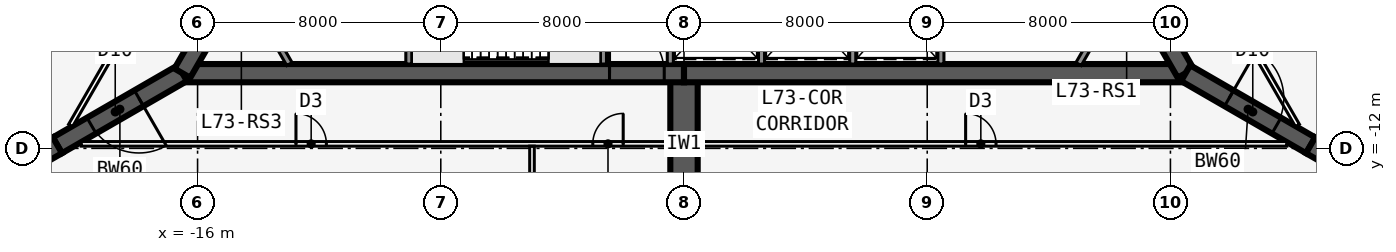
"""IFC4 building model, lengths in metres.
Left out: names, types, materials, properties, quantities, classifications, styles, units other than length and angle.
Written with IfcOpenShell. Run it as: python <this file> out.ifc"""

import sys

from ifc_helpers import new_model, si_unit, direction, frame, frame_2d, origin, place, context, subcontext, project, spatial, polyline, rectangle, outline, extrude, element, fill, save


model = new_model("IFC4")
c1 = context("Model", 3, precision=1e-05, world=origin(), true_north=direction((0.0, 1.0)))
c2 = subcontext(c1, "Body", "Model", "MODEL_VIEW")
j1 = project(units=[si_unit("LENGTHUNIT", "METRE"), si_unit("PLANEANGLEUNIT", "RADIAN")], contexts=[c1])
p1 = place(None, origin())
s1 = spatial("IfcSite", under=j1, at=p1, CompositionType="ELEMENT")
p2 = place(p1, origin())
s2 = spatial("IfcBuilding", under=s1, at=p2, CompositionType="ELEMENT")
p3 = place(p2, frame((0.0, 0.0, 275.3)))
s3 = spatial("IfcBuildingStorey", under=s2, at=p3, CompositionType="ELEMENT", Elevation=275.3)
p4 = place(p3, frame((-16.5, -9.526, 0.0), z_axis=(0.0, 0.0, 1.0), x_axis=(1.0, 0.0, 0.0)))
e1 = element("IfcWall", 1, at=p4, inside=s3, PredefinedType="SHEAR", context=c2, shape_type="SweptSolid", body=[
    extrude(rectangle(XDim=16.5, YDim=0.6, at=frame_2d((8.25, 0.0))), origin(), (0.0, 0.0, 1.0), 6.0),
])
p5 = place(p4, frame((14.05, 0.0, 0.0)))
e2 = element("IfcOpeningElement", 2, at=p5, cuts=e1, PredefinedType="OPENING", context=c2, shape_type="SweptSolid", body=[
    extrude(rectangle(XDim=1.8, YDim=2.13, at=frame_2d((0.9, 1.065))), frame((0.0, 0.31, 0.0), z_axis=(0.0, -1.0, 0.0), x_axis=(1.0, 0.0, 0.0)), (0.0, 0.0, 1.0), 0.62),
])
p6 = place(p3, frame((0.0, -9.526, 0.0), z_axis=(0.0, 0.0, 1.0), x_axis=(1.0, 0.0, 0.0)))
e3 = element("IfcWall", 3, at=p6, inside=s3, PredefinedType="SHEAR", context=c2, shape_type="SweptSolid", body=[
    extrude(rectangle(XDim=16.5, YDim=0.6, at=frame_2d((8.25, 0.0))), origin(), (0.0, 0.0, 1.0), 6.0),
])
p7 = place(p3, frame((-9.05, -5.951, 0.0), z_axis=(0.0, 0.0, 1.0), x_axis=(0.0, -1.0, 0.0)))
e4 = element("IfcWall", 4, at=p7, inside=s3, PredefinedType="SOLIDWALL", context=c2, shape_type="SweptSolid", body=[
    extrude(rectangle(XDim=3.275, YDim=0.2, at=frame_2d((1.637, 0.0))), origin(), (0.0, 0.0, 1.0), 5.75),
])
p8 = place(p3, frame((-2.65, -5.951, 0.0), z_axis=(0.0, 0.0, 1.0), x_axis=(0.0, -1.0, 0.0)))
e5 = element("IfcWall", 5, at=p8, inside=s3, PredefinedType="SOLIDWALL", context=c2, shape_type="SweptSolid", body=[
    extrude(rectangle(XDim=3.275, YDim=0.2, at=frame_2d((1.637, 0.0))), origin(), (0.0, 0.0, 1.0), 5.75),
])
p9 = place(p8, frame((1.675, 0.0, 0.0)))
e6 = element("IfcOpeningElement", 6, at=p9, cuts=e5, PredefinedType="OPENING", context=c2, shape_type="SweptSolid", body=[
    extrude(rectangle(XDim=1.0, YDim=2.13, at=frame_2d((0.5, 1.065))), frame((0.0, 0.11, 0.0), z_axis=(0.0, -1.0, 0.0), x_axis=(1.0, 0.0, 0.0)), (0.0, 0.0, 1.0), 0.22),
])
for number, where, z_axis, x_axis in (
    (7, (-0.45, -5.951, 0.0), (0.0, 0.0, 1.0), (0.0, -1.0, 0.0)),
    (8, (2.55, -5.951, 0.0), (0.0, 0.0, 1.0), (0.0, -1.0, 0.0)),
    (9, (5.55, -5.951, 0.0), (0.0, 0.0, 1.0), (0.0, -1.0, 0.0)),
    (10, (8.45, -5.951, 0.0), (0.0, 0.0, 1.0), (0.0, -1.0, 0.0)),
):
    element("IfcWall", number, at=place(p3, frame(where, z_axis=z_axis, x_axis=x_axis)), inside=s3, PredefinedType="SOLIDWALL", context=c2, shape_type="SweptSolid", body=[
        extrude(rectangle(XDim=3.275, YDim=0.2, at=frame_2d((1.637, 0.0))), origin(), (0.0, 0.0, 1.0), 5.75),
    ])
p10 = place(p3, frame((16.5, -9.526, 0.0), z_axis=(0.0, 0.0, 1.0), x_axis=(-0.499996545922, 0.866027397988, 0.0)))
e11 = element("IfcWall", 11, at=p10, inside=s3, PredefinedType="SHEAR", context=c2, shape_type="SweptSolid", body=[
    extrude(rectangle(XDim=16.5, YDim=0.6, at=frame_2d((8.25, 0.0))), origin(), (0.0, 0.0, 1.0), 6.0),
])
p11 = place(p10, frame((14.15, 0.0, 0.0)))
e12 = element("IfcOpeningElement", 12, at=p11, cuts=e11, PredefinedType="OPENING", context=c2, shape_type="SweptSolid", body=[
    extrude(rectangle(XDim=1.8, YDim=2.13, at=frame_2d((0.9, 1.065))), frame((0.0, 0.31, 0.0), z_axis=(0.0, -1.0, 0.0), x_axis=(1.0, 0.0, 0.0)), (0.0, 0.0, 1.0), 0.62),
])
p12 = place(p10, frame((12.6, 0.0, 0.0)))
e13 = element("IfcOpeningElement", 13, at=p12, cuts=e11, PredefinedType="OPENING", context=c2, shape_type="SweptSolid", body=[
    extrude(rectangle(XDim=1.0, YDim=2.13, at=frame_2d((0.5, 1.065))), frame((0.0, 0.31, 0.0), z_axis=(0.0, -1.0, 0.0), x_axis=(1.0, 0.0, 0.0)), (0.0, 0.0, 1.0), 0.62),
])
p13 = place(p3, frame((-8.25, 4.763, 0.0), z_axis=(0.0, 0.0, 1.0), x_axis=(-0.499996545922, -0.866027397988, 0.0)))
e14 = element("IfcWall", 14, at=p13, inside=s3, PredefinedType="SHEAR", context=c2, shape_type="SweptSolid", body=[
    extrude(rectangle(XDim=16.5, YDim=0.6, at=frame_2d((8.25, 0.0))), origin(), (0.0, 0.0, 1.0), 6.0),
])
p14 = place(p3, frame((16.5, -9.526, 0.0), z_axis=(0.0, 0.0, 1.0), x_axis=(0.866031398331, -0.499989616998, 0.0)))
e15 = element("IfcWall", 15, at=p14, inside=s3, PredefinedType="SHEAR", context=c2, shape_type="SweptSolid", body=[
    extrude(rectangle(XDim=4.746, YDim=0.6, at=frame_2d((2.373, 0.0))), origin(), (0.0, 0.0, 1.0), 6.0),
])
p15 = place(p14, frame((1.65, 0.0, 0.0)))
e16 = element("IfcOpeningElement", 16, at=p15, cuts=e15, PredefinedType="OPENING", context=c2, shape_type="SweptSolid", body=[
    extrude(rectangle(XDim=1.8, YDim=2.13, at=frame_2d((0.9, 1.065))), frame((0.0, 0.31, 0.0), z_axis=(0.0, -1.0, 0.0), x_axis=(1.0, 0.0, 0.0)), (0.0, 0.0, 1.0), 0.62),
])
p16 = place(p3, frame((20.61, -11.899, 0.0), z_axis=(0.0, 0.0, 1.0), x_axis=(0.866009537788, -0.500027479704, 0.0)))
e17 = element("IfcWall", 17, at=p16, inside=s3, PredefinedType="SHEAR", context=c2, shape_type="SweptSolid", body=[
    extrude(rectangle(XDim=1.155, YDim=0.6, at=frame_2d((0.577, 0.0))), origin(), (0.0, 0.0, 1.0), 6.0),
])
p17 = place(p3, frame((-16.5, -9.526, 0.0), z_axis=(0.0, 0.0, 1.0), x_axis=(-0.866031398331, -0.499989616998, 0.0)))
e18 = element("IfcWall", 18, at=p17, inside=s3, PredefinedType="SHEAR", context=c2, shape_type="SweptSolid", body=[
    extrude(rectangle(XDim=4.746, YDim=0.6, at=frame_2d((2.373, 0.0))), origin(), (0.0, 0.0, 1.0), 6.0),
])
p18 = place(p17, frame((1.65, 0.0, 0.0)))
e19 = element("IfcOpeningElement", 19, at=p18, cuts=e18, PredefinedType="OPENING", context=c2, shape_type="SweptSolid", body=[
    extrude(rectangle(XDim=1.8, YDim=2.13, at=frame_2d((0.9, 1.065))), frame((0.0, 0.31, 0.0), z_axis=(0.0, -1.0, 0.0), x_axis=(1.0, 0.0, 0.0)), (0.0, 0.0, 1.0), 0.62),
])
p19 = place(p3, frame((-20.61, -11.899, 0.0), z_axis=(0.0, 0.0, 1.0), x_axis=(-0.866009537788, -0.500027479704, 0.0)))
e20 = element("IfcWall", 20, at=p19, inside=s3, PredefinedType="SHEAR", context=c2, shape_type="SweptSolid", body=[
    extrude(rectangle(XDim=1.155, YDim=0.6, at=frame_2d((0.577, 0.0))), origin(), (0.0, 0.0, 1.0), 6.0),
])
p20 = place(p3, frame((0.0, -9.526, 0.0), z_axis=(0.0, 0.0, 1.0), x_axis=(0.0, -1.0, 0.0)))
e21 = element("IfcWall", 21, at=p20, inside=s3, PredefinedType="SHEAR", context=c2, shape_type="SweptSolid", body=[
    extrude(rectangle(XDim=8.154, YDim=0.9, at=frame_2d((4.077, 0.0))), origin(), (0.0, 0.0, 1.0), 6.0),
])
p21 = place(p3, frame((18.46, -15.924, 0.0), z_axis=(0.0, 0.0, 1.0), x_axis=(0.707081252484, 0.707132308968, 0.0)))
e22 = element("IfcWall", 22, at=p21, inside=s3, PredefinedType="SOLIDWALL", context=c2, shape_type="SweptSolid", body=[
    extrude(outline(polyline([(4.782, 0.225), (4.723, 0.225), (4.375, 0.132), (4.351, 0.225), (0.0, 0.225), (0.0, -0.225), (4.782, -0.225), (4.782, 0.225)])), origin(), (0.0, 0.0, 1.0), 5.75),
])
p22 = place(p21, frame((0.75, 0.0, 0.9)))
e23 = element("IfcOpeningElement", 23, at=p22, cuts=e22, PredefinedType="OPENING", context=c2, shape_type="SweptSolid", body=[
    extrude(rectangle(XDim=3.0, YDim=3.6, at=frame_2d((1.5, 1.8))), frame((0.0, 0.235, 0.0), z_axis=(0.0, -1.0, 0.0), x_axis=(1.0, 0.0, 0.0)), (0.0, 0.0, 1.0), 0.47),
])
p23 = place(p3, frame((-21.841, -12.542, 0.0), z_axis=(0.0, 0.0, 1.0), x_axis=(0.707081252484, -0.707132308968, 0.0)))
e24 = element("IfcWall", 24, at=p23, inside=s3, PredefinedType="SOLIDWALL", context=c2, shape_type="SweptSolid", body=[
    extrude(outline(polyline([(4.782, 0.225), (0.431, 0.225), (0.406, 0.132), (0.059, 0.225), (0.0, 0.225), (0.0, -0.225), (4.782, -0.225), (4.782, 0.225)])), origin(), (0.0, 0.0, 1.0), 5.75),
])
p24 = place(p23, frame((1.031, 0.0, 0.9)))
e25 = element("IfcOpeningElement", 25, at=p24, cuts=e24, PredefinedType="OPENING", context=c2, shape_type="SweptSolid", body=[
    extrude(rectangle(XDim=3.0, YDim=3.6, at=frame_2d((1.5, 1.8))), frame((0.0, 0.235, 0.0), z_axis=(0.0, -1.0, 0.0), x_axis=(1.0, 0.0, 0.0)), (0.0, 0.0, 1.0), 0.47),
])
p25 = place(p3, frame((-19.827, -11.851, 0.0), z_axis=(0.0, 0.0, 1.0), x_axis=(1.0, 0.0, 0.0)))
e26 = element("IfcWall", 26, at=p25, inside=s3, PredefinedType="PARTITIONING", context=c2, shape_type="SweptSolid", body=[
    extrude(rectangle(XDim=39.654, YDim=0.15, at=frame_2d((19.827, 0.0))), origin(), (0.0, 0.0, 1.0), 5.75),
])
p26 = place(p25, frame((7.063, 0.0, 0.0)))
e27 = element("IfcOpeningElement", 27, at=p26, cuts=e26, PredefinedType="OPENING", context=c2, shape_type="SweptSolid", body=[
    extrude(rectangle(XDim=1.0, YDim=2.13, at=frame_2d((0.5, 1.065))), frame((0.0, 0.085, 0.0), z_axis=(0.0, -1.0, 0.0), x_axis=(1.0, 0.0, 0.0)), (0.0, 0.0, 1.0), 0.17),
])
p27 = place(p25, frame((16.827, 0.0, 0.0)))
e28 = element("IfcOpeningElement", 28, at=p27, cuts=e26, PredefinedType="OPENING", context=c2, shape_type="SweptSolid", body=[
    extrude(rectangle(XDim=1.0, YDim=2.13, at=frame_2d((0.5, 1.065))), frame((0.0, 0.085, 0.0), z_axis=(0.0, -1.0, 0.0), x_axis=(1.0, 0.0, 0.0)), (0.0, 0.0, 1.0), 0.17),
])
p28 = place(p25, frame((29.091, 0.0, 0.0)))
e29 = element("IfcOpeningElement", 29, at=p28, cuts=e26, PredefinedType="OPENING", context=c2, shape_type="SweptSolid", body=[
    extrude(rectangle(XDim=1.0, YDim=2.13, at=frame_2d((0.5, 1.065))), frame((0.0, 0.085, 0.0), z_axis=(0.0, -1.0, 0.0), x_axis=(1.0, 0.0, 0.0)), (0.0, 0.0, 1.0), 0.17),
])
p29 = place(p3, frame((-5.0, -11.926, 0.0), z_axis=(0.0, 0.0, 1.0), x_axis=(0.0, -1.0, 0.0)))
e30 = element("IfcWall", 30, at=p29, inside=s3, PredefinedType="PARTITIONING", context=c2, shape_type="SweptSolid", body=[
    extrude(rectangle(XDim=6.853, YDim=0.15, at=frame_2d((3.426, 0.0))), origin(), (0.0, 0.0, 1.0), 4.35),
])
p30 = place(p3, frame((20.177, -11.245, 0.0), z_axis=(0.0, 0.0, 1.0), x_axis=(-0.499998875317, 0.866026053119, 0.0)))
e31 = element("IfcWall", 31, at=p30, inside=s3, PredefinedType="PARTITIONING", context=c2, shape_type="SweptSolid", body=[
    extrude(rectangle(XDim=39.654, YDim=0.15, at=frame_2d((19.827, 0.0))), origin(), (0.0, 0.0, 1.0), 5.75),
])
p31 = place(p30, frame((6.563, 0.0, 0.0)))
e32 = element("IfcOpeningElement", 32, at=p31, cuts=e31, PredefinedType="OPENING", context=c2, shape_type="SweptSolid", body=[
    extrude(rectangle(XDim=1.0, YDim=2.13, at=frame_2d((0.5, 1.065))), frame((0.0, 0.085, 0.0), z_axis=(0.0, -1.0, 0.0), x_axis=(1.0, 0.0, 0.0)), (0.0, 0.0, 1.0), 0.17),
])
p32 = place(p30, frame((16.327, 0.0, 0.0)))
e33 = element("IfcOpeningElement", 33, at=p32, cuts=e31, PredefinedType="OPENING", context=c2, shape_type="SweptSolid", body=[
    extrude(rectangle(XDim=1.0, YDim=2.13, at=frame_2d((0.5, 1.065))), frame((0.0, 0.085, 0.0), z_axis=(0.0, -1.0, 0.0), x_axis=(1.0, 0.0, 0.0)), (0.0, 0.0, 1.0), 0.17),
])
p33 = place(p30, frame((29.091, 0.0, 0.0)))
e34 = element("IfcOpeningElement", 34, at=p33, cuts=e31, PredefinedType="OPENING", context=c2, shape_type="SweptSolid", body=[
    extrude(rectangle(XDim=1.0, YDim=2.13, at=frame_2d((0.5, 1.065))), frame((0.0, 0.085, 0.0), z_axis=(0.0, -1.0, 0.0), x_axis=(1.0, 0.0, 0.0)), (0.0, 0.0, 1.0), 0.17),
])
p34 = place(p3, frame((-0.35, 23.096, 0.0), z_axis=(0.0, 0.0, 1.0), x_axis=(-0.499998875317, -0.866026053119, 0.0)))
e35 = element("IfcWall", 35, at=p34, inside=s3, PredefinedType="PARTITIONING", context=c2, shape_type="SweptSolid", body=[
    extrude(rectangle(XDim=39.654, YDim=0.15, at=frame_2d((19.827, 0.0))), origin(), (0.0, 0.0, 1.0), 5.75),
])
p35 = place(p34, frame((9.563, 0.0, 0.0)))
e36 = element("IfcOpeningElement", 36, at=p35, cuts=e35, PredefinedType="OPENING", context=c2, shape_type="SweptSolid", body=[
    extrude(rectangle(XDim=1.0, YDim=2.13, at=frame_2d((0.5, 1.065))), frame((0.0, 0.085, 0.0), z_axis=(0.0, -1.0, 0.0), x_axis=(1.0, 0.0, 0.0)), (0.0, 0.0, 1.0), 0.17),
])
p36 = place(p34, frame((22.327, 0.0, 0.0)))
e37 = element("IfcOpeningElement", 37, at=p36, cuts=e35, PredefinedType="OPENING", context=c2, shape_type="SweptSolid", body=[
    extrude(rectangle(XDim=1.0, YDim=2.13, at=frame_2d((0.5, 1.065))), frame((0.0, 0.085, 0.0), z_axis=(0.0, -1.0, 0.0), x_axis=(1.0, 0.0, 0.0)), (0.0, 0.0, 1.0), 0.17),
])
p37 = place(p34, frame((32.091, 0.0, 0.0)))
e38 = element("IfcOpeningElement", 38, at=p37, cuts=e35, PredefinedType="OPENING", context=c2, shape_type="SweptSolid", body=[
    extrude(rectangle(XDim=1.0, YDim=2.13, at=frame_2d((0.5, 1.065))), frame((0.0, 0.085, 0.0), z_axis=(0.0, -1.0, 0.0), x_axis=(1.0, 0.0, 0.0)), (0.0, 0.0, 1.0), 0.17),
])
for number, where, z_axis, x_axis in (
    (39, (14.479, -6.626, 0.0), (0.0, 0.0, 1.0), (-0.5, -0.866, 0.0)),
    (40, (-12.978, -9.226, 0.0), (0.0, 0.0, 1.0), (-0.5, 0.866, 0.0)),
):
    element("IfcWall", number, at=place(p3, frame(where, z_axis=z_axis, x_axis=x_axis)), inside=s3, PredefinedType="SOLIDWALL", context=c2, shape_type="SweptSolid", body=[
        extrude(rectangle(XDim=3.002, YDim=0.2, at=frame_2d((1.501, 0.0))), origin(), (0.0, 0.0, 1.0), 5.75),
    ])
p38 = place(p26, origin())
e41 = element("IfcDoor", 41, at=p38, inside=s3, OperationType="SINGLE_SWING_LEFT", PredefinedType="DOOR", context=c2, shape_type="SweptSolid", body=[
    extrude(rectangle(XDim=1.0, YDim=2.13, at=frame_2d((0.5, 1.065))), frame((0.0, 0.025, 0.0), z_axis=(0.0, -1.0, 0.0), x_axis=(1.0, 0.0, 0.0)), (0.0, 0.0, 1.0), 0.05),
])
fill(e27, e41)
p39 = place(p27, origin())
e42 = element("IfcDoor", 42, at=p39, inside=s3, OperationType="SINGLE_SWING_RIGHT", PredefinedType="DOOR", context=c2, shape_type="SweptSolid", body=[
    extrude(rectangle(XDim=1.0, YDim=2.13, at=frame_2d((0.5, 1.065))), frame((0.0, 0.025, 0.0), z_axis=(0.0, -1.0, 0.0), x_axis=(1.0, 0.0, 0.0)), (0.0, 0.0, 1.0), 0.05),
])
fill(e28, e42)
p40 = place(p28, origin())
e43 = element("IfcDoor", 43, at=p40, inside=s3, OperationType="SINGLE_SWING_LEFT", PredefinedType="DOOR", context=c2, shape_type="SweptSolid", body=[
    extrude(rectangle(XDim=1.0, YDim=2.13, at=frame_2d((0.5, 1.065))), frame((0.0, 0.025, 0.0), z_axis=(0.0, -1.0, 0.0), x_axis=(1.0, 0.0, 0.0)), (0.0, 0.0, 1.0), 0.05),
])
fill(e29, e43)
p41 = place(p5, origin())
e44 = element("IfcDoor", 44, at=p41, inside=s3, OperationType="DOUBLE_DOOR_SINGLE_SWING", PredefinedType="DOOR", context=c2, shape_type="SweptSolid", body=[
    extrude(rectangle(XDim=1.8, YDim=2.13, at=frame_2d((0.9, 1.065))), frame((0.0, 0.025, 0.0), z_axis=(0.0, -1.0, 0.0), x_axis=(1.0, 0.0, 0.0)), (0.0, 0.0, 1.0), 0.05),
])
fill(e2, e44)
p42 = place(p15, origin())
e45 = element("IfcDoor", 45, at=p42, inside=s3, OperationType="DOUBLE_DOOR_DOUBLE_SWING", PredefinedType="DOOR", context=c2, shape_type="SweptSolid", body=[
    extrude(rectangle(XDim=1.8, YDim=2.13, at=frame_2d((0.9, 1.065))), frame((0.0, 0.025, 0.0), z_axis=(0.0, -1.0, 0.0), x_axis=(1.0, 0.0, 0.0)), (0.0, 0.0, 1.0), 0.05),
])
fill(e16, e45)
p43 = place(p18, origin())
e46 = element("IfcDoor", 46, at=p43, inside=s3, OperationType="DOUBLE_DOOR_DOUBLE_SWING", PredefinedType="DOOR", context=c2, shape_type="SweptSolid", body=[
    extrude(rectangle(XDim=1.8, YDim=2.13, at=frame_2d((0.9, 1.065))), frame((0.0, 0.025, 0.0), z_axis=(0.0, -1.0, 0.0), x_axis=(1.0, 0.0, 0.0)), (0.0, 0.0, 1.0), 0.05),
])
fill(e19, e46)
save(model, sys.argv[1])
